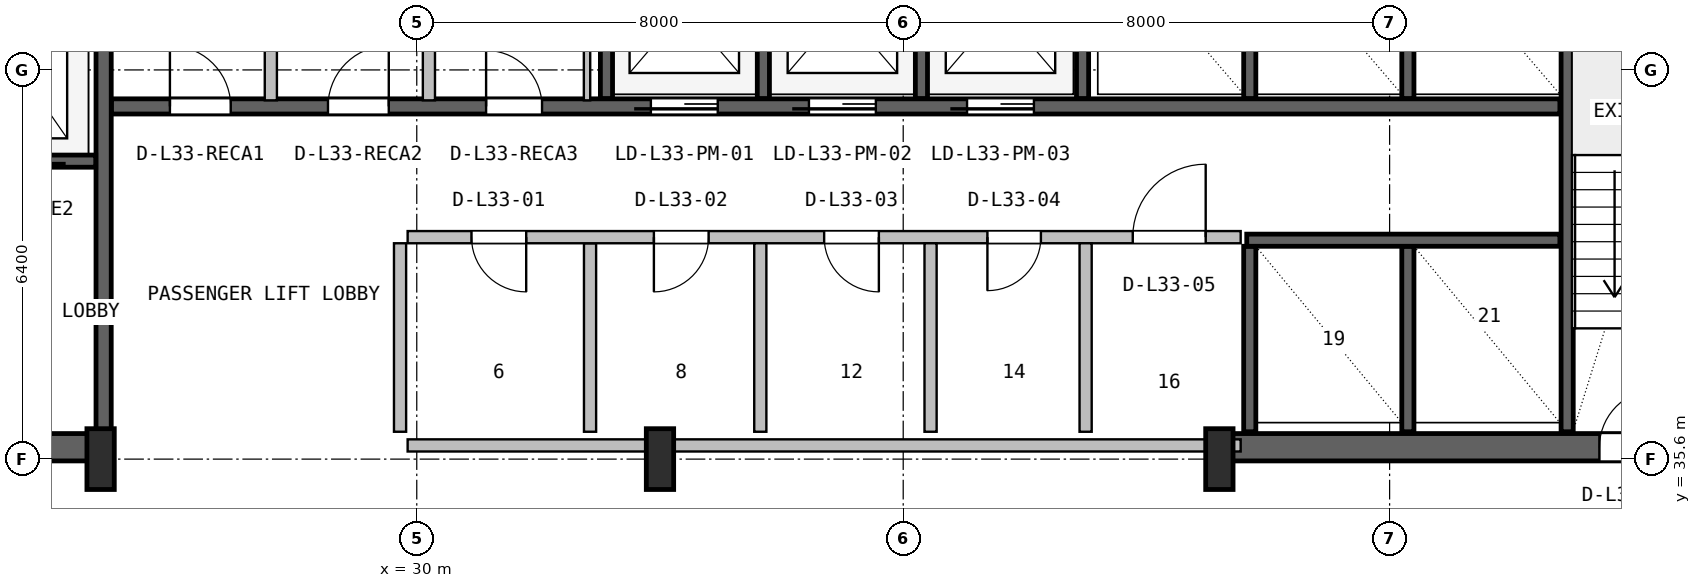
"""IFC4 building model, lengths in metres.
Left out: names, types, materials, properties, quantities, classifications, styles, units other than length and angle.
Written with IfcOpenShell. Run it as: python <this file> out.ifc"""

import sys

from ifc_helpers import new_model, si_unit, direction, frame, frame_2d, origin, origin_2d, place, context, subcontext, project, spatial, rectangle, i_section, extrude, source, transform, mapped, element, fill, save


model = new_model("IFC4")
c1 = context("Model", 3, precision=1e-05, world=origin(), true_north=direction((0.0, 1.0)))
c2 = subcontext(c1, "Body", "Model", "MODEL_VIEW")
j1 = project(units=[si_unit("LENGTHUNIT", "METRE"), si_unit("PLANEANGLEUNIT", "RADIAN")], contexts=[c1])
p1 = place(None, origin())
s1 = spatial("IfcSite", under=j1, at=p1, CompositionType="ELEMENT")
p2 = place(p1, origin())
s2 = spatial("IfcBuilding", under=s1, at=p2, CompositionType="ELEMENT")
p3 = place(p2, frame((0.0, 0.0, 137.2)))
s3 = spatial("IfcBuildingStorey", under=s2, at=p3, CompositionType="ELEMENT", Elevation=137.2)
p4 = place(p3, frame((15.57, 35.795, 0.0), z_axis=(0.0, 0.0, 1.0), x_axis=(1.0, 0.0, 0.0)))
e1 = element("IfcWall", 1, at=p4, inside=s3, PredefinedType="SHEAR", context=c2, shape_type="SweptSolid", body=[
    extrude(rectangle(XDim=9.23, YDim=0.45, at=frame_2d((4.615, 0.0))), origin(), (0.0, 0.0, 1.0), 3.48),
])
p5 = place(p4, frame((5.4, 0.0, 0.0)))
e2 = element("IfcOpeningElement", 2, at=p5, cuts=e1, PredefinedType="OPENING", context=c2, shape_type="SweptSolid", body=[
    extrude(rectangle(XDim=1.0, YDim=2.1, at=frame_2d((0.5, 1.05))), frame((0.0, 0.235, 0.0), z_axis=(0.0, -1.0, 0.0), x_axis=(1.0, 0.0, 0.0)), (0.0, 0.0, 1.0), 0.47),
])
p6 = place(p3, frame((43.2, 35.795, 0.0), z_axis=(0.0, 0.0, 1.0), x_axis=(1.0, 0.0, 0.0)))
e3 = element("IfcWall", 3, at=p6, inside=s3, PredefinedType="SHEAR", context=c2, shape_type="SweptSolid", body=[
    extrude(rectangle(XDim=9.23, YDim=0.45, at=frame_2d((4.615, 0.0))), origin(), (0.0, 0.0, 1.0), 3.48),
])
p7 = place(p6, frame((6.25, 0.0, 0.0)))
e4 = element("IfcOpeningElement", 4, at=p7, cuts=e3, PredefinedType="OPENING", context=c2, shape_type="SweptSolid", body=[
    extrude(rectangle(XDim=0.95, YDim=2.1, at=frame_2d((0.475, 1.05))), frame((0.0, 0.235, 0.0), z_axis=(0.0, -1.0, 0.0), x_axis=(1.0, 0.0, 0.0)), (0.0, 0.0, 1.0), 0.47),
])
m1 = source(origin(), c2, "Body", "SweptSolid", [
    extrude(i_section(OverallWidth=0.45, OverallDepth=1.0, WebThickness=0.016, FlangeThickness=0.03, FilletRadius=0.016, at=origin_2d()), origin(), (0.0, 0.0, 1.0), 3.8),
])
for number, where, z_axis, x_axis in (
    (5, (24.8, 35.6, 0.0), (0.0, 0.0, 1.0), (1.0, 0.0, 0.0)),
    (6, (34.0, 35.6, 0.0), (0.0, 0.0, 1.0), (1.0, 0.0, 0.0)),
    (7, (43.2, 35.6, 0.0), (0.0, 0.0, 1.0), (1.0, 0.0, 0.0)),
):
    element("IfcColumn", number, at=place(p3, frame(where, z_axis=z_axis, x_axis=x_axis)), inside=s3, PredefinedType="COLUMN", context=c2, shape_type="MappedRepresentation", body=[
        mapped(m1, transform((0.0, 0.0, 0.0), x_axis=(1.0, 0.0, 0.0), y_axis=(0.0, 1.0, 0.0), z_axis=(0.0, 0.0, 1.0), scale=1.0)),
    ])
p8 = place(p3, frame((24.85, 36.05, 0.0), z_axis=(0.0, 0.0, 1.0), x_axis=(0.0, 1.0, 0.0)))
e8 = element("IfcWall", 8, at=p8, inside=s3, PredefinedType="SHEAR", context=c2, shape_type="SweptSolid", body=[
    extrude(rectangle(XDim=10.45, YDim=0.25, at=frame_2d((5.225, 0.0))), origin(), (0.0, 0.0, 1.0), 3.48),
])
p9 = place(p3, frame((19.2, 40.5, 0.0), z_axis=(0.0, 0.0, 1.0), x_axis=(1.0, 0.0, 0.0)))
e9 = element("IfcWall", 9, at=p9, inside=s3, PredefinedType="SHEAR", context=c2, shape_type="SweptSolid", body=[
    extrude(rectangle(XDim=5.52, YDim=0.2, at=frame_2d((2.76, 0.0))), origin(), (0.0, 0.0, 1.0), 3.48),
])
p10 = place(p9, frame((1.05, 0.0, 0.0)))
e10 = element("IfcOpeningElement", 10, at=p10, cuts=e9, PredefinedType="OPENING", context=c2, shape_type="SweptSolid", body=[
    extrude(rectangle(XDim=1.1, YDim=2.18, at=frame_2d((0.55, 1.09))), frame((0.0, 0.11, 0.0), z_axis=(0.0, -1.0, 0.0), x_axis=(1.0, 0.0, 0.0)), (0.0, 0.0, 1.0), 0.22),
])
p11 = place(p9, frame((3.65, 0.0, 0.0)))
e11 = element("IfcOpeningElement", 11, at=p11, cuts=e9, PredefinedType="OPENING", context=c2, shape_type="SweptSolid", body=[
    extrude(rectangle(XDim=1.1, YDim=2.18, at=frame_2d((0.55, 1.09))), frame((0.0, 0.11, 0.0), z_axis=(0.0, -1.0, 0.0), x_axis=(1.0, 0.0, 0.0)), (0.0, 0.0, 1.0), 0.22),
])
p12 = place(p3, frame((48.92, 36.05, 0.0), z_axis=(0.0, 0.0, 1.0), x_axis=(0.0, 1.0, 0.0)))
e12 = element("IfcWall", 12, at=p12, inside=s3, PredefinedType="SHEAR", context=c2, shape_type="SweptSolid", body=[
    extrude(rectangle(XDim=10.5, YDim=0.2, at=frame_2d((5.25, 0.0))), origin(), (0.0, 0.0, 1.0), 3.48),
])
p13 = place(p3, frame((24.98, 41.4, 0.0), z_axis=(0.0, 0.0, 1.0), x_axis=(1.0, 0.0, 0.0)))
e13 = element("IfcWall", 13, at=p13, inside=s3, PredefinedType="SHEAR", context=c2, shape_type="SweptSolid", body=[
    extrude(rectangle(XDim=23.82, YDim=0.25, at=frame_2d((11.91, 0.0))), origin(), (0.0, 0.0, 1.0), 3.48),
])
p14 = place(p13, frame((8.87, 0.0, 0.0)))
e14 = element("IfcOpeningElement", 14, at=p14, cuts=e13, PredefinedType="OPENING", context=c2, shape_type="SweptSolid", body=[
    extrude(rectangle(XDim=1.1, YDim=2.18, at=frame_2d((0.55, 1.09))), frame((0.0, 0.135, 0.0), z_axis=(0.0, -1.0, 0.0), x_axis=(1.0, 0.0, 0.0)), (0.0, 0.0, 1.0), 0.27),
])
p15 = place(p13, frame((11.47, 0.0, 0.0)))
e15 = element("IfcOpeningElement", 15, at=p15, cuts=e13, PredefinedType="OPENING", context=c2, shape_type="SweptSolid", body=[
    extrude(rectangle(XDim=1.1, YDim=2.18, at=frame_2d((0.55, 1.09))), frame((0.0, 0.135, 0.0), z_axis=(0.0, -1.0, 0.0), x_axis=(1.0, 0.0, 0.0)), (0.0, 0.0, 1.0), 0.27),
])
p16 = place(p13, frame((14.07, 0.0, 0.0)))
e16 = element("IfcOpeningElement", 16, at=p16, cuts=e13, PredefinedType="OPENING", context=c2, shape_type="SweptSolid", body=[
    extrude(rectangle(XDim=1.1, YDim=2.18, at=frame_2d((0.55, 1.09))), frame((0.0, 0.135, 0.0), z_axis=(0.0, -1.0, 0.0), x_axis=(1.0, 0.0, 0.0)), (0.0, 0.0, 1.0), 0.27),
])
p17 = place(p13, frame((0.96, 0.0, 0.0)))
e17 = element("IfcOpeningElement", 17, at=p17, cuts=e13, PredefinedType="OPENING", context=c2, shape_type="SweptSolid", body=[
    extrude(rectangle(XDim=1.0, YDim=2.08, at=frame_2d((0.5, 1.04))), frame((0.0, 0.135, 0.0), z_axis=(0.0, -1.0, 0.0), x_axis=(1.0, 0.0, 0.0)), (0.0, 0.0, 1.0), 0.27),
])
p18 = place(p13, frame((3.56, 0.0, 0.0)))
e18 = element("IfcOpeningElement", 18, at=p18, cuts=e13, PredefinedType="OPENING", context=c2, shape_type="SweptSolid", body=[
    extrude(rectangle(XDim=1.0, YDim=2.08, at=frame_2d((0.5, 1.04))), frame((0.0, 0.135, 0.0), z_axis=(0.0, -1.0, 0.0), x_axis=(1.0, 0.0, 0.0)), (0.0, 0.0, 1.0), 0.27),
])
p19 = place(p13, frame((6.16, 0.0, 0.0)))
e19 = element("IfcOpeningElement", 19, at=p19, cuts=e13, PredefinedType="OPENING", context=c2, shape_type="SweptSolid", body=[
    extrude(rectangle(XDim=0.92, YDim=2.08, at=frame_2d((0.46, 1.04))), frame((0.0, 0.135, 0.0), z_axis=(0.0, -1.0, 0.0), x_axis=(1.0, 0.0, 0.0)), (0.0, 0.0, 1.0), 0.27),
])
p20 = place(p3, frame((33.12, 41.53, 0.0), z_axis=(0.0, 0.0, 1.0), x_axis=(0.0, 1.0, 0.0)))
e20 = element("IfcWall", 20, at=p20, inside=s3, PredefinedType="SHEAR", context=c2, shape_type="SweptSolid", body=[
    extrude(rectangle(XDim=5.02, YDim=0.2, at=frame_2d((2.51, 0.0))), origin(), (0.0, 0.0, 1.0), 3.48),
])
for number, where, z_axis, x_axis in (
    (21, (35.7, 41.53, 0.0), (0.0, 0.0, 1.0), (0.0, 1.0, 0.0)),
    (22, (38.3, 41.53, 0.0), (0.0, 0.0, 1.0), (0.0, 1.0, 0.0)),
):
    element("IfcWall", number, at=place(p3, frame(where, z_axis=z_axis, x_axis=x_axis)), inside=s3, PredefinedType="SHEAR", context=c2, shape_type="SweptSolid", body=[
        extrude(rectangle(XDim=2.87, YDim=0.2, at=frame_2d((1.435, 0.0))), origin(), (0.0, 0.0, 1.0), 3.48),
    ])
p21 = place(p3, frame((40.95, 41.53, 0.0), z_axis=(0.0, 0.0, 1.0), x_axis=(0.0, 1.0, 0.0)))
e23 = element("IfcWall", 23, at=p21, inside=s3, PredefinedType="SHEAR", context=c2, shape_type="SweptSolid", body=[
    extrude(rectangle(XDim=5.02, YDim=0.2, at=frame_2d((2.51, 0.0))), origin(), (0.0, 0.0, 1.0), 3.48),
])
for number, where, z_axis, x_axis in (
    (24, (43.7, 41.53, 0.0), (0.0, 0.0, 1.0), (0.0, 1.0, 0.0)),
    (25, (46.3, 41.53, 0.0), (0.0, 0.0, 1.0), (0.0, 1.0, 0.0)),
):
    element("IfcWall", number, at=place(p3, frame(where, z_axis=z_axis, x_axis=x_axis)), inside=s3, PredefinedType="SHEAR", context=c2, shape_type="SweptSolid", body=[
        extrude(rectangle(XDim=2.87, YDim=0.2, at=frame_2d((1.435, 0.0))), origin(), (0.0, 0.0, 1.0), 3.48),
    ])
for number, where, z_axis, x_axis in (
    (26, (43.7, 36.05, 0.0), (0.0, 0.0, 1.0), (0.0, 1.0, 0.0)),
    (27, (46.3, 36.05, 0.0), (0.0, 0.0, 1.0), (0.0, 1.0, 0.0)),
):
    element("IfcWall", number, at=place(p3, frame(where, z_axis=z_axis, x_axis=x_axis)), inside=s3, PredefinedType="SHEAR", context=c2, shape_type="SweptSolid", body=[
        extrude(rectangle(XDim=3.05, YDim=0.2, at=frame_2d((1.525, 0.0))), origin(), (0.0, 0.0, 1.0), 3.48),
    ])
p22 = place(p3, frame((43.65, 39.2, 0.0), z_axis=(0.0, 0.0, 1.0), x_axis=(1.0, 0.0, 0.0)))
e28 = element("IfcWall", 28, at=p22, inside=s3, PredefinedType="SHEAR", context=c2, shape_type="SweptSolid", body=[
    extrude(rectangle(XDim=5.15, YDim=0.2, at=frame_2d((2.575, 0.0))), origin(), (0.0, 0.0, 1.0), 3.48),
])
p23 = place(p3, frame((29.85, 35.825, 0.0), z_axis=(0.0, 0.0, 1.0), x_axis=(1.0, 0.0, 0.0)))
e29 = element("IfcWall", 29, at=p23, inside=s3, PredefinedType="SOLIDWALL", context=c2, shape_type="SweptSolid", body=[
    extrude(rectangle(XDim=13.7, YDim=0.2, at=frame_2d((6.85, 0.0))), origin(), (0.0, 0.0, 1.0), 2.255),
])
p24 = place(p3, frame((32.85, 36.05, 0.0), z_axis=(0.0, 0.0, 1.0), x_axis=(0.0, 1.0, 0.0)))
e30 = element("IfcWall", 30, at=p24, inside=s3, PredefinedType="PLUMBINGWALL", context=c2, shape_type="SweptSolid", body=[
    extrude(rectangle(XDim=3.1, YDim=0.2, at=frame_2d((1.55, 0.0))), origin(), (0.0, 0.0, 1.0), 3.46),
])
p25 = place(p3, frame((29.85, 39.25, 0.0), z_axis=(0.0, 0.0, 1.0), x_axis=(1.0, 0.0, 0.0)))
e31 = element("IfcWall", 31, at=p25, inside=s3, PredefinedType="SOLIDWALL", context=c2, shape_type="SweptSolid", body=[
    extrude(rectangle(XDim=13.7, YDim=0.2, at=frame_2d((6.85, 0.0))), origin(), (0.0, 0.0, 1.0), 3.46),
])
p26 = place(p25, frame((1.05, 0.0, 0.0)))
e32 = element("IfcOpeningElement", 32, at=p26, cuts=e31, PredefinedType="OPENING", context=c2, shape_type="SweptSolid", body=[
    extrude(rectangle(XDim=0.9, YDim=2.06, at=frame_2d((0.45, 1.03))), frame((0.0, 0.11, 0.0), z_axis=(0.0, -1.0, 0.0), x_axis=(1.0, 0.0, 0.0)), (0.0, 0.0, 1.0), 0.22),
])
p27 = place(p25, frame((4.05, 0.0, 0.0)))
e33 = element("IfcOpeningElement", 33, at=p27, cuts=e31, PredefinedType="OPENING", context=c2, shape_type="SweptSolid", body=[
    extrude(rectangle(XDim=0.9, YDim=2.06, at=frame_2d((0.45, 1.03))), frame((0.0, 0.11, 0.0), z_axis=(0.0, -1.0, 0.0), x_axis=(1.0, 0.0, 0.0)), (0.0, 0.0, 1.0), 0.22),
])
p28 = place(p25, frame((6.85, 0.0, 0.0)))
e34 = element("IfcOpeningElement", 34, at=p28, cuts=e31, PredefinedType="OPENING", context=c2, shape_type="SweptSolid", body=[
    extrude(rectangle(XDim=0.9, YDim=2.06, at=frame_2d((0.45, 1.03))), frame((0.0, 0.11, 0.0), z_axis=(0.0, -1.0, 0.0), x_axis=(1.0, 0.0, 0.0)), (0.0, 0.0, 1.0), 0.22),
])
p29 = place(p25, frame((9.535, 0.0, 0.0)))
e35 = element("IfcOpeningElement", 35, at=p29, cuts=e31, PredefinedType="OPENING", context=c2, shape_type="SweptSolid", body=[
    extrude(rectangle(XDim=0.88, YDim=2.06, at=frame_2d((0.44, 1.03))), frame((0.0, 0.11, 0.0), z_axis=(0.0, -1.0, 0.0), x_axis=(1.0, 0.0, 0.0)), (0.0, 0.0, 1.0), 0.22),
])
p30 = place(p25, frame((11.925, 0.0, 0.0)))
e36 = element("IfcOpeningElement", 36, at=p30, cuts=e31, PredefinedType="OPENING", context=c2, shape_type="SweptSolid", body=[
    extrude(rectangle(XDim=1.2, YDim=2.1, at=frame_2d((0.6, 1.05))), frame((0.0, 0.11, 0.0), z_axis=(0.0, -1.0, 0.0), x_axis=(1.0, 0.0, 0.0)), (0.0, 0.0, 1.0), 0.22),
])
for number, where, z_axis, x_axis in (
    (37, (29.725, 36.05, 0.0), (0.0, 0.0, 1.0), (0.0, 1.0, 0.0)),
    (38, (35.65, 36.05, 0.0), (0.0, 0.0, 1.0), (0.0, 1.0, 0.0)),
    (39, (38.45, 36.05, 0.0), (0.0, 0.0, 1.0), (0.0, 1.0, 0.0)),
):
    element("IfcWall", number, at=place(p3, frame(where, z_axis=z_axis, x_axis=x_axis)), inside=s3, PredefinedType="PLUMBINGWALL", context=c2, shape_type="SweptSolid", body=[
        extrude(rectangle(XDim=3.1, YDim=0.2, at=frame_2d((1.55, 0.0))), origin(), (0.0, 0.0, 1.0), 3.46),
    ])
p31 = place(p3, frame((41.0, 36.05, 0.0), z_axis=(0.0, 0.0, 1.0), x_axis=(0.0, 1.0, 0.0)))
e40 = element("IfcWall", 40, at=p31, inside=s3, PredefinedType="SOLIDWALL", context=c2, shape_type="SweptSolid", body=[
    extrude(rectangle(XDim=3.1, YDim=0.2, at=frame_2d((1.55, 0.0))), origin(), (0.0, 0.0, 1.0), 3.46),
])
for number, where, z_axis, x_axis in (
    (41, (27.6, 41.5, 0.0), (0.0, 0.0, 1.0), (0.0, 1.0, 0.0)),
    (42, (30.2, 41.5, 0.0), (0.0, 0.0, 1.0), (0.0, 1.0, 0.0)),
):
    element("IfcWall", number, at=place(p3, frame(where, z_axis=z_axis, x_axis=x_axis)), inside=s3, PredefinedType="SOLIDWALL", context=c2, shape_type="SweptSolid", body=[
        extrude(rectangle(XDim=5.02, YDim=0.2, at=frame_2d((2.51, 0.0))), origin(), (0.0, 0.0, 1.0), 3.46),
    ])
p32 = place(p3, frame((32.8, 41.5, 0.0), z_axis=(0.0, 0.0, 1.0), x_axis=(0.0, 1.0, 0.0)))
e43 = element("IfcWall", 43, at=p32, inside=s3, PredefinedType="PARTITIONING", context=c2, shape_type="SweptSolid", body=[
    extrude(rectangle(XDim=5.02, YDim=0.105, at=frame_2d((2.51, 0.0))), origin(), (0.0, 0.0, 1.0), 3.46),
])
m2 = source(origin(), c2, "Body", "SweptSolid", [
    extrude(rectangle(XDim=0.95, YDim=2.1, at=frame_2d((0.475, 1.05))), frame((0.0, 0.025, 0.0), z_axis=(0.0, -1.0, 0.0), x_axis=(1.0, 0.0, 0.0)), (0.0, 0.0, 1.0), 0.05),
])
p33 = place(p7, origin())
e44 = element("IfcDoor", 44, at=p33, inside=s3, OperationType="SINGLE_SWING_RIGHT", PredefinedType="DOOR", context=c2, shape_type="MappedRepresentation", body=[
    mapped(m2, transform((0.0, 0.0, 0.0), x_axis=(1.0, 0.0, 0.0), y_axis=(0.0, 1.0, 0.0), z_axis=(0.0, 0.0, 1.0), scale=1.0)),
])
fill(e4, e44)
m3 = source(origin(), c2, "Body", "SweptSolid", [
    extrude(rectangle(XDim=1.1, YDim=2.18, at=frame_2d((0.55, 1.09))), frame((0.0, 0.025, 0.0), z_axis=(0.0, -1.0, 0.0), x_axis=(1.0, 0.0, 0.0)), (0.0, 0.0, 1.0), 0.05),
])
p34 = place(p14, frame((1.1, 0.0, 0.0), z_axis=(0.0, 0.0, 1.0), x_axis=(-1.0, 0.0, 0.0)))
e45 = element("IfcDoor", 45, at=p34, inside=s3, OperationType="SLIDING_TO_LEFT", PredefinedType="DOOR", context=c2, shape_type="MappedRepresentation", body=[
    mapped(m3, transform((0.0, 0.0, 0.0), x_axis=(1.0, 0.0, 0.0), y_axis=(0.0, 1.0, 0.0), z_axis=(0.0, 0.0, 1.0), scale=1.0)),
])
fill(e14, e45)
p35 = place(p15, frame((1.1, 0.0, 0.0), z_axis=(0.0, 0.0, 1.0), x_axis=(-1.0, 0.0, 0.0)))
e46 = element("IfcDoor", 46, at=p35, inside=s3, OperationType="SLIDING_TO_LEFT", PredefinedType="DOOR", context=c2, shape_type="MappedRepresentation", body=[
    mapped(m3, transform((0.0, 0.0, 0.0), x_axis=(1.0, 0.0, 0.0), y_axis=(0.0, 1.0, 0.0), z_axis=(0.0, 0.0, 1.0), scale=1.0)),
])
fill(e15, e46)
p36 = place(p16, frame((1.1, 0.0, 0.0), z_axis=(0.0, 0.0, 1.0), x_axis=(-1.0, 0.0, 0.0)))
e47 = element("IfcDoor", 47, at=p36, inside=s3, OperationType="SLIDING_TO_LEFT", PredefinedType="DOOR", context=c2, shape_type="MappedRepresentation", body=[
    mapped(m3, transform((0.0, 0.0, 0.0), x_axis=(1.0, 0.0, 0.0), y_axis=(0.0, 1.0, 0.0), z_axis=(0.0, 0.0, 1.0), scale=1.0)),
])
fill(e16, e47)
m4 = source(origin(), c2, "Body", "SweptSolid", [
    extrude(rectangle(XDim=1.0, YDim=2.08, at=frame_2d((0.5, 1.04))), frame((0.0, 0.025, 0.0), z_axis=(0.0, -1.0, 0.0), x_axis=(1.0, 0.0, 0.0)), (0.0, 0.0, 1.0), 0.05),
])
p37 = place(p17, origin())
e48 = element("IfcDoor", 48, at=p37, inside=s3, OperationType="SINGLE_SWING_LEFT", PredefinedType="DOOR", context=c2, shape_type="MappedRepresentation", body=[
    mapped(m4, transform((0.0, 0.0, 0.0), x_axis=(1.0, 0.0, 0.0), y_axis=(0.0, 1.0, 0.0), z_axis=(0.0, 0.0, 1.0), scale=1.0)),
])
fill(e17, e48)
p38 = place(p18, origin())
e49 = element("IfcDoor", 49, at=p38, inside=s3, OperationType="SINGLE_SWING_RIGHT", PredefinedType="DOOR", context=c2, shape_type="MappedRepresentation", body=[
    mapped(m4, transform((0.0, 0.0, 0.0), x_axis=(1.0, 0.0, 0.0), y_axis=(0.0, 1.0, 0.0), z_axis=(0.0, 0.0, 1.0), scale=1.0)),
])
fill(e18, e49)
m5 = source(origin(), c2, "Body", "SweptSolid", [
    extrude(rectangle(XDim=0.92, YDim=2.08, at=frame_2d((0.46, 1.04))), frame((0.0, 0.025, 0.0), z_axis=(0.0, -1.0, 0.0), x_axis=(1.0, 0.0, 0.0)), (0.0, 0.0, 1.0), 0.05),
])
p39 = place(p19, origin())
e50 = element("IfcDoor", 50, at=p39, inside=s3, OperationType="SINGLE_SWING_LEFT", PredefinedType="DOOR", context=c2, shape_type="MappedRepresentation", body=[
    mapped(m5, transform((0.0, 0.0, 0.0), x_axis=(1.0, 0.0, 0.0), y_axis=(0.0, 1.0, 0.0), z_axis=(0.0, 0.0, 1.0), scale=1.0)),
])
fill(e19, e50)
m6 = source(origin(), c2, "Body", "SweptSolid", [
    extrude(rectangle(XDim=0.9, YDim=2.06, at=frame_2d((0.45, 1.03))), frame((0.0, 0.025, 0.0), z_axis=(0.0, -1.0, 0.0), x_axis=(1.0, 0.0, 0.0)), (0.0, 0.0, 1.0), 0.05),
])
p40 = place(p26, frame((0.9, 0.0, 0.0), z_axis=(0.0, 0.0, 1.0), x_axis=(-1.0, 0.0, 0.0)))
e51 = element("IfcDoor", 51, at=p40, inside=s3, OperationType="SINGLE_SWING_RIGHT", PredefinedType="DOOR", context=c2, shape_type="MappedRepresentation", body=[
    mapped(m6, transform((0.0, 0.0, 0.0), x_axis=(1.0, 0.0, 0.0), y_axis=(0.0, 1.0, 0.0), z_axis=(0.0, 0.0, 1.0), scale=1.0)),
])
fill(e32, e51)
p41 = place(p27, frame((0.9, 0.0, 0.0), z_axis=(0.0, 0.0, 1.0), x_axis=(-1.0, 0.0, 0.0)))
e52 = element("IfcDoor", 52, at=p41, inside=s3, OperationType="SINGLE_SWING_LEFT", PredefinedType="DOOR", context=c2, shape_type="MappedRepresentation", body=[
    mapped(m6, transform((0.0, 0.0, 0.0), x_axis=(1.0, 0.0, 0.0), y_axis=(0.0, 1.0, 0.0), z_axis=(0.0, 0.0, 1.0), scale=1.0)),
])
fill(e33, e52)
p42 = place(p28, frame((0.9, 0.0, 0.0), z_axis=(0.0, 0.0, 1.0), x_axis=(-1.0, 0.0, 0.0)))
e53 = element("IfcDoor", 53, at=p42, inside=s3, OperationType="SINGLE_SWING_RIGHT", PredefinedType="DOOR", context=c2, shape_type="MappedRepresentation", body=[
    mapped(m6, transform((0.0, 0.0, 0.0), x_axis=(1.0, 0.0, 0.0), y_axis=(0.0, 1.0, 0.0), z_axis=(0.0, 0.0, 1.0), scale=1.0)),
])
fill(e34, e53)
m7 = source(origin(), c2, "Body", "SweptSolid", [
    extrude(rectangle(XDim=0.88, YDim=2.06, at=frame_2d((0.44, 1.03))), frame((0.0, 0.025, 0.0), z_axis=(0.0, -1.0, 0.0), x_axis=(1.0, 0.0, 0.0)), (0.0, 0.0, 1.0), 0.05),
])
p43 = place(p29, frame((0.88, 0.0, 0.0), z_axis=(0.0, 0.0, 1.0), x_axis=(-1.0, 0.0, 0.0)))
e54 = element("IfcDoor", 54, at=p43, inside=s3, OperationType="SINGLE_SWING_LEFT", PredefinedType="DOOR", context=c2, shape_type="MappedRepresentation", body=[
    mapped(m7, transform((0.0, 0.0, 0.0), x_axis=(1.0, 0.0, 0.0), y_axis=(0.0, 1.0, 0.0), z_axis=(0.0, 0.0, 1.0), scale=1.0)),
])
fill(e35, e54)
m8 = source(origin(), c2, "Body", "SweptSolid", [
    extrude(rectangle(XDim=1.2, YDim=2.1, at=frame_2d((0.6, 1.05))), frame((0.0, 0.025, 0.0), z_axis=(0.0, -1.0, 0.0), x_axis=(1.0, 0.0, 0.0)), (0.0, 0.0, 1.0), 0.05),
])
p44 = place(p30, origin())
e55 = element("IfcDoor", 55, at=p44, inside=s3, OperationType="SINGLE_SWING_RIGHT", PredefinedType="DOOR", context=c2, shape_type="MappedRepresentation", body=[
    mapped(m8, transform((0.0, 0.0, 0.0), x_axis=(1.0, 0.0, 0.0), y_axis=(0.0, 1.0, 0.0), z_axis=(0.0, 0.0, 1.0), scale=1.0)),
])
fill(e36, e55)
save(model, sys.argv[1])
